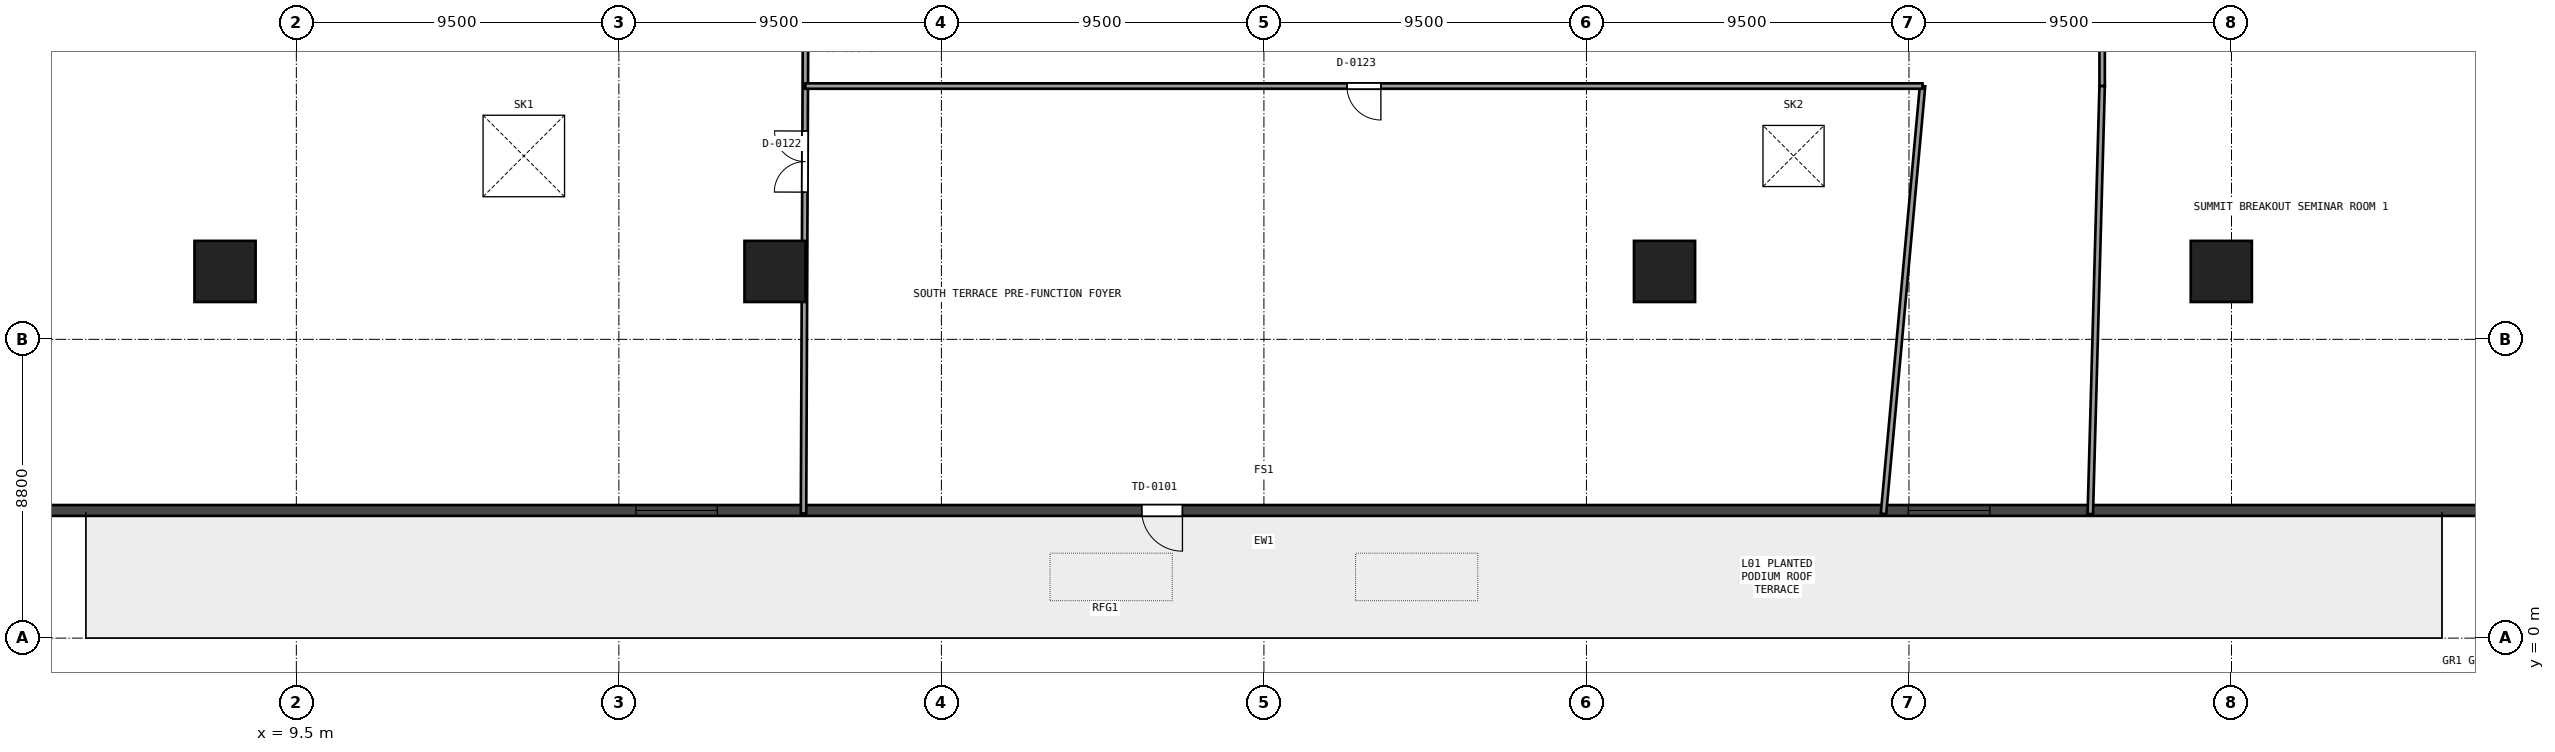
"""IFC4 building model, lengths in metres.
Left out: names, types, materials, properties, quantities, classifications, styles, units other than length and angle.
Written with IfcOpenShell. Run it as: python <this file> out.ifc"""

import sys

from ifc_helpers import new_model, si_unit, direction, frame, frame_2d, origin, origin_2d, place, context, subcontext, project, spatial, rectangle, extrude, element, fill, save


model = new_model("IFC4")
c1 = context("Model", 3, precision=1e-05, world=origin(), true_north=direction((0.0, 1.0)))
c2 = subcontext(c1, "Body", "Model", "MODEL_VIEW")
j1 = project(units=[si_unit("LENGTHUNIT", "METRE"), si_unit("PLANEANGLEUNIT", "RADIAN")], contexts=[c1])
p1 = place(None, origin())
s1 = spatial("IfcSite", under=j1, at=p1, CompositionType="ELEMENT")
p2 = place(p1, origin())
s2 = spatial("IfcBuilding", under=s1, at=p2, CompositionType="ELEMENT")
p3 = place(p2, frame((0.0, 0.0, 5.4)))
s3 = spatial("IfcBuildingStorey", under=s2, at=p3, CompositionType="ELEMENT", Elevation=5.4)
for number, where, z_axis, x_axis in (
    (1, (7.4, 10.8, 0.0), (0.0, 0.0, 1.0), (1.0, 0.0, 0.0)),
    (2, (23.6, 10.8, 0.0), (0.0, 0.0, 1.0), (1.0, 0.0, 0.0)),
    (3, (49.8, 10.8, 0.0), (0.0, 0.0, 1.0), (1.0, 0.0, 0.0)),
    (4, (66.2, 10.8, 0.0), (0.0, 0.0, 1.0), (1.0, 0.0, 0.0)),
):
    element("IfcColumn", number, at=place(p3, frame(where, z_axis=z_axis, x_axis=x_axis)), inside=s3, PredefinedType="COLUMN", context=c2, shape_type="SweptSolid", body=[
        extrude(rectangle(XDim=1.8, YDim=1.8, at=origin_2d()), origin(), (0.0, 0.0, 1.0), 5.05),
    ])
p4 = place(p3, frame((74.04, 3.76, 0.0), z_axis=(0.0, 0.0, 1.0), x_axis=(-1.0, 0.0, 0.0)))
e5 = element("IfcWall", 5, at=p4, inside=s3, PredefinedType="SOLIDWALL", context=c2, shape_type="SweptSolid", body=[
    extrude(rectangle(XDim=72.08, YDim=0.32, at=frame_2d((36.04, 0.0))), origin(), (0.0, 0.0, 1.0), 5.05),
])
p5 = place(p4, frame((14.658, 0.0, 0.95)))
e6 = element("IfcOpeningElement", 6, at=p5, cuts=e5, PredefinedType="OPENING", context=c2, shape_type="SweptSolid", body=[
    extrude(rectangle(XDim=2.4, YDim=2.5, at=frame_2d((1.2, 1.25))), frame((0.0, 0.17, 0.0), z_axis=(0.0, -1.0, 0.0), x_axis=(1.0, 0.0, 0.0)), (0.0, 0.0, 1.0), 0.34),
])
p6 = place(p4, frame((52.139, 0.0, 0.95)))
e7 = element("IfcOpeningElement", 7, at=p6, cuts=e5, PredefinedType="OPENING", context=c2, shape_type="SweptSolid", body=[
    extrude(rectangle(XDim=2.4, YDim=2.5, at=frame_2d((1.2, 1.25))), frame((0.0, 0.17, 0.0), z_axis=(0.0, -1.0, 0.0), x_axis=(1.0, 0.0, 0.0)), (0.0, 0.0, 1.0), 0.34),
])
p7 = place(p4, frame((38.44, 0.0, 0.0)))
e8 = element("IfcOpeningElement", 8, at=p7, cuts=e5, PredefinedType="OPENING", context=c2, shape_type="SweptSolid", body=[
    extrude(rectangle(XDim=1.2, YDim=2.2, at=frame_2d((0.6, 1.1))), frame((0.0, 0.17, 0.0), z_axis=(0.0, -1.0, 0.0), x_axis=(1.0, 0.0, 0.0)), (0.0, 0.0, 1.0), 0.34),
])
p8 = place(p3, frame((24.439, 3.67, 0.0), z_axis=(0.0, 0.0, 1.0), x_axis=(0.004145530271, 0.999991407252, 0.0)))
e9 = element("IfcWall", 9, at=p8, inside=s3, PredefinedType="PARTITIONING", context=c2, shape_type="SweptSolid", body=[
    extrude(rectangle(XDim=20.73, YDim=0.16, at=frame_2d((10.365, 0.0))), origin(), (0.0, 0.0, 1.0), 4.123),
])
p9 = place(p8, frame((9.465, 0.0, 0.0)))
e10 = element("IfcOpeningElement", 10, at=p9, cuts=e9, PredefinedType="OPENING", context=c2, shape_type="SweptSolid", body=[
    extrude(rectangle(XDim=1.8, YDim=2.25, at=frame_2d((0.9, 1.125))), frame((0.0, 0.09, 0.0), z_axis=(0.0, -1.0, 0.0), x_axis=(1.0, 0.0, 0.0)), (0.0, 0.0, 1.0), 0.18),
])
p10 = place(p3, frame((56.249, 3.661, 0.0), z_axis=(0.0, 0.0, 1.0), x_axis=(0.090967236709, 0.995853885791, 0.0)))
e11 = element("IfcWall", 11, at=p10, inside=s3, PredefinedType="PARTITIONING", context=c2, shape_type="SweptSolid", body=[
    extrude(rectangle(XDim=12.652, YDim=0.16, at=frame_2d((6.326, 0.0))), origin(), (0.0, 0.0, 1.0), 4.123),
])
p11 = place(p3, frame((57.4, 16.26, 0.0), z_axis=(0.0, 0.0, 1.0), x_axis=(-1.0, 0.0, 0.0)))
e12 = element("IfcWall", 12, at=p11, inside=s3, PredefinedType="PARTITIONING", context=c2, shape_type="SweptSolid", body=[
    extrude(rectangle(XDim=32.909, YDim=0.16, at=frame_2d((16.455, 0.0))), origin(), (0.0, 0.0, 1.0), 4.203),
])
p12 = place(p11, frame((15.955, 0.0, 0.0)))
e13 = element("IfcOpeningElement", 13, at=p12, cuts=e12, PredefinedType="OPENING", context=c2, shape_type="SweptSolid", body=[
    extrude(rectangle(XDim=1.0, YDim=2.15, at=frame_2d((0.5, 1.075))), frame((0.0, 0.09, 0.0), z_axis=(0.0, -1.0, 0.0), x_axis=(1.0, 0.0, 0.0)), (0.0, 0.0, 1.0), 0.18),
])
p13 = place(p3, frame((62.69, 20.69, 0.0), z_axis=(0.0, 0.0, 1.0), x_axis=(0.0, -1.0, 0.0)))
e14 = element("IfcWall", 14, at=p13, inside=s3, PredefinedType="PARTITIONING", context=c2, shape_type="SweptSolid", body=[
    extrude(rectangle(XDim=4.43, YDim=0.16, at=frame_2d((2.215, 0.0))), origin(), (0.0, 0.0, 1.0), 4.135),
])
p14 = place(p3, frame((62.69, 16.26, 0.0), z_axis=(0.0, 0.0, 1.0), x_axis=(-0.027664969833, -0.999617251474, 0.0)))
e15 = element("IfcWall", 15, at=p14, inside=s3, PredefinedType="PARTITIONING", context=c2, shape_type="SweptSolid", body=[
    extrude(rectangle(XDim=12.611, YDim=0.16, at=frame_2d((6.305, 0.0))), origin(), (0.0, 0.0, 1.0), 4.123),
])
p15 = place(p5, origin())
e16 = element("IfcWindow", 16, at=p15, inside=s3, PartitioningType="SINGLE_PANEL", PredefinedType="WINDOW", context=c2, shape_type="SweptSolid", body=[
    extrude(rectangle(XDim=2.4, YDim=2.5, at=frame_2d((1.2, 1.25))), frame((0.0, 0.03, 0.0), z_axis=(0.0, -1.0, 0.0), x_axis=(1.0, 0.0, 0.0)), (0.0, 0.0, 1.0), 0.06),
])
fill(e6, e16)
p16 = place(p6, origin())
e17 = element("IfcWindow", 17, at=p16, inside=s3, PartitioningType="SINGLE_PANEL", PredefinedType="WINDOW", context=c2, shape_type="SweptSolid", body=[
    extrude(rectangle(XDim=2.4, YDim=2.5, at=frame_2d((1.2, 1.25))), frame((0.0, 0.03, 0.0), z_axis=(0.0, -1.0, 0.0), x_axis=(1.0, 0.0, 0.0)), (0.0, 0.0, 1.0), 0.06),
])
fill(e7, e17)
p17 = place(p7, origin())
e18 = element("IfcDoor", 18, at=p17, inside=s3, OperationType="SINGLE_SWING_LEFT", PredefinedType="DOOR", context=c2, shape_type="SweptSolid", body=[
    extrude(rectangle(XDim=1.2, YDim=2.2, at=frame_2d((0.6, 1.1))), frame((0.0, 0.025, 0.0), z_axis=(0.0, -1.0, 0.0), x_axis=(1.0, 0.0, 0.0)), (0.0, 0.0, 1.0), 0.05),
])
fill(e8, e18)
p18 = place(p3, frame((0.0, 0.0, -0.35)))
p19 = place(p18, frame((16.2, 14.2, 0.0)))
p20 = place(p19, frame((0.0, 0.0, 0.3)))
e19 = element("IfcWindow", 19, at=p20, inside=s3, PartitioningType="SINGLE_PANEL", PredefinedType="SKYLIGHT", context=c2, shape_type="SweptSolid", body=[
    extrude(rectangle(XDim=2.4, YDim=2.4, at=origin_2d()), origin(), (0.0, 0.0, 1.0), 0.05),
])
p21 = place(p18, frame((53.6, 14.2, 0.0)))
p22 = place(p21, frame((0.0, 0.0, 0.3)))
e20 = element("IfcWindow", 20, at=p22, inside=s3, PartitioningType="SINGLE_PANEL", PredefinedType="SKYLIGHT", context=c2, shape_type="SweptSolid", body=[
    extrude(rectangle(XDim=1.8, YDim=1.8, at=origin_2d()), origin(), (0.0, 0.0, 1.0), 0.05),
])
p23 = place(p9, origin())
e21 = element("IfcDoor", 21, at=p23, inside=s3, OperationType="DOUBLE_DOOR_SINGLE_SWING", PredefinedType="DOOR", context=c2, shape_type="SweptSolid", body=[
    extrude(rectangle(XDim=1.8, YDim=2.25, at=frame_2d((0.9, 1.125))), frame((0.0, 0.025, 0.0), z_axis=(0.0, -1.0, 0.0), x_axis=(1.0, 0.0, 0.0)), (0.0, 0.0, 1.0), 0.05),
])
fill(e10, e21)
p24 = place(p12, origin())
e22 = element("IfcDoor", 22, at=p24, inside=s3, OperationType="SINGLE_SWING_LEFT", PredefinedType="DOOR", context=c2, shape_type="SweptSolid", body=[
    extrude(rectangle(XDim=1.0, YDim=2.15, at=frame_2d((0.5, 1.075))), frame((0.0, 0.025, 0.0), z_axis=(0.0, -1.0, 0.0), x_axis=(1.0, 0.0, 0.0)), (0.0, 0.0, 1.0), 0.05),
])
fill(e13, e22)
save(model, sys.argv[1])
